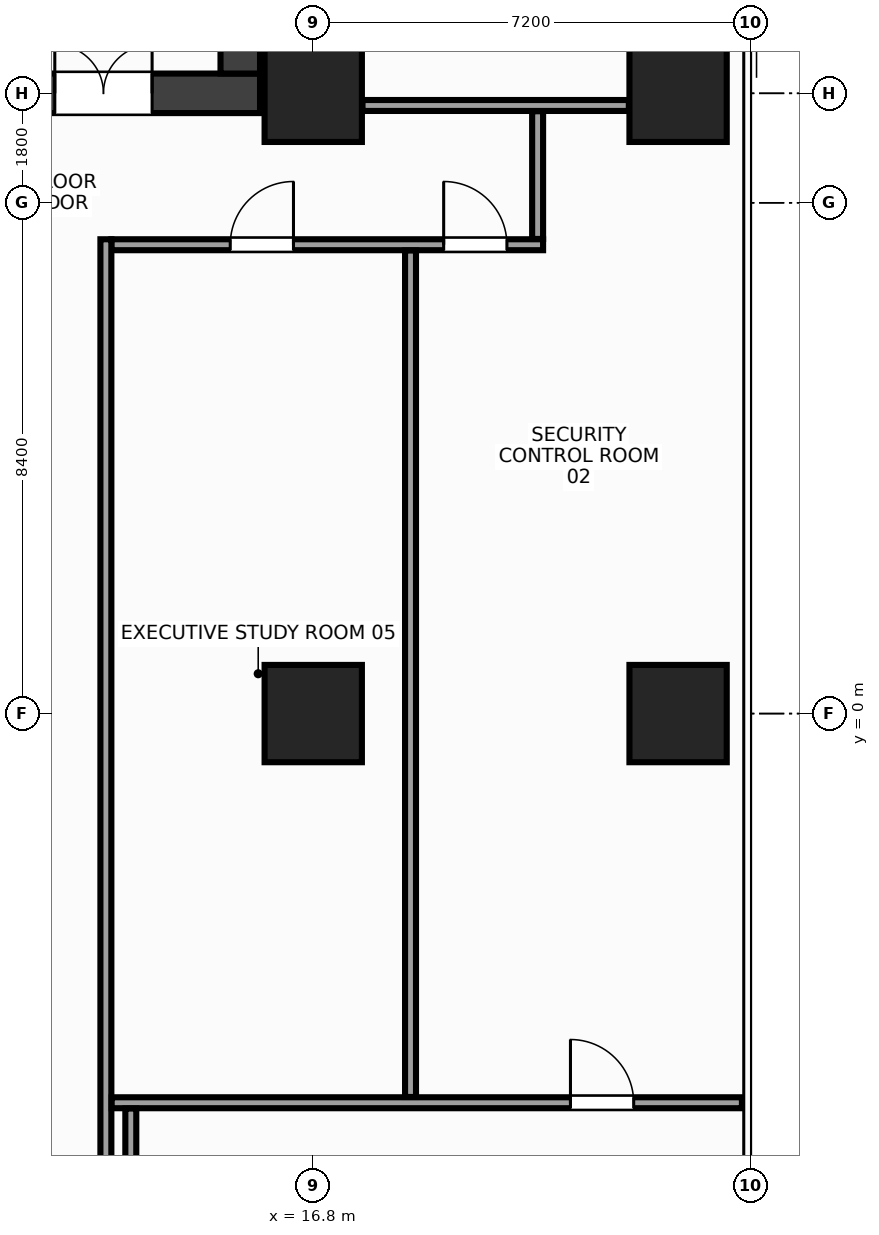
"""IFC4 building model, lengths in metres.
Left out: names, types, materials, properties, quantities, classifications, styles, units other than length and angle.
Written with IfcOpenShell. Run it as: python <this file> out.ifc"""

import sys

from ifc_helpers import new_model, si_unit, direction, frame, frame_2d, origin, origin_2d, place, context, subcontext, project, spatial, rectangle, extrude, source, transform, mapped, element, fill, save


model = new_model("IFC4")
c1 = context("Model", 3, precision=1e-05, world=origin(), true_north=direction((0.0, 1.0)))
c2 = subcontext(c1, "Body", "Model", "MODEL_VIEW")
j1 = project(units=[si_unit("LENGTHUNIT", "METRE"), si_unit("PLANEANGLEUNIT", "RADIAN")], contexts=[c1])
p1 = place(None, origin())
s1 = spatial("IfcSite", under=j1, at=p1, CompositionType="ELEMENT")
p2 = place(p1, origin())
s2 = spatial("IfcBuilding", under=s1, at=p2, CompositionType="ELEMENT")
p3 = place(p2, frame((0.0, 0.0, 167.6)))
s3 = spatial("IfcBuildingStorey", under=s2, at=p3, CompositionType="ELEMENT", Elevation=167.6)
m1 = source(origin(), c2, "Body", "SweptSolid", [
    extrude(rectangle(XDim=31.85, YDim=0.65, at=frame_2d((15.925, 0.0))), origin(), (0.0, 0.0, 1.0), 3.6),
])
p4 = place(p3, frame((-15.925, 10.2, 0.0), z_axis=(0.0, 0.0, 1.0), x_axis=(1.0, 0.0, 0.0)))
e1 = element("IfcWall", 1, at=p4, inside=s3, PredefinedType="SHEAR", context=c2, shape_type="MappedRepresentation", body=[
    mapped(m1, transform((0.0, 0.0, 0.0), x_axis=(1.0, 0.0, 0.0), y_axis=(0.0, 1.0, 0.0), z_axis=(0.0, 0.0, 1.0), scale=1.0)),
])
p5 = place(p4, frame((1.775, 0.0, 0.0)))
e2 = element("IfcOpeningElement", 2, at=p5, cuts=e1, PredefinedType="OPENING", context=c2, shape_type="SweptSolid", body=[
    extrude(rectangle(XDim=1.6, YDim=2.15, at=frame_2d((0.8, 1.075))), frame((0.0, 0.337, 0.0), z_axis=(0.0, -1.0, 0.0), x_axis=(1.0, 0.0, 0.0)), (0.0, 0.0, 1.0), 0.674),
])
p6 = place(p4, frame((28.475, 0.0, 0.0)))
e3 = element("IfcOpeningElement", 3, at=p6, cuts=e1, PredefinedType="OPENING", context=c2, shape_type="SweptSolid", body=[
    extrude(rectangle(XDim=1.6, YDim=2.15, at=frame_2d((0.8, 1.075))), frame((0.0, 0.337, 0.0), z_axis=(0.0, -1.0, 0.0), x_axis=(1.0, 0.0, 0.0)), (0.0, 0.0, 1.0), 0.674),
])
p7 = place(p4, frame((15.175, 0.0, 0.0)))
e4 = element("IfcOpeningElement", 4, at=p7, cuts=e1, PredefinedType="OPENING", context=c2, shape_type="SweptSolid", body=[
    extrude(rectangle(XDim=1.5, YDim=2.2, at=frame_2d((0.75, 1.1))), frame((0.0, 0.337, 0.0), z_axis=(0.0, -1.0, 0.0), x_axis=(1.0, 0.0, 0.0)), (0.0, 0.0, 1.0), 0.674),
])
m2 = source(origin(), c2, "Body", "SweptSolid", [
    extrude(rectangle(XDim=12.95, YDim=0.65, at=frame_2d((6.475, 0.0))), origin(), (0.0, 0.0, 1.0), 3.6),
])
p8 = place(p3, frame((15.6, 10.525, 0.0), z_axis=(0.0, 0.0, 1.0), x_axis=(0.0, 1.0, 0.0)))
e5 = element("IfcWall", 5, at=p8, inside=s3, PredefinedType="SHEAR", context=c2, shape_type="MappedRepresentation", body=[
    mapped(m2, transform((0.0, 0.0, 0.0), x_axis=(1.0, 0.0, 0.0), y_axis=(0.0, 1.0, 0.0), z_axis=(0.0, 0.0, 1.0), scale=1.0)),
])
m3 = source(origin(), c2, "Body", "SweptSolid", [
    extrude(rectangle(XDim=1.6, YDim=1.6, at=origin_2d()), origin(), (0.0, 0.0, 1.0), 3.6),
])
for number, where, z_axis, x_axis in (
    (6, (16.8, 0.0, 0.0), (0.0, 0.0, 1.0), (1.0, 0.0, 0.0)),
    (7, (16.8, 10.2, 0.0), (0.0, 0.0, 1.0), (1.0, 0.0, 0.0)),
    (8, (22.8, 0.0, 0.0), (0.0, 0.0, 1.0), (1.0, 0.0, 0.0)),
    (9, (22.8, 10.2, 0.0), (0.0, 0.0, 1.0), (1.0, 0.0, 0.0)),
):
    element("IfcColumn", number, at=place(p3, frame(where, z_axis=z_axis, x_axis=x_axis)), inside=s3, PredefinedType="COLUMN", context=c2, shape_type="MappedRepresentation", body=[
        mapped(m3, transform((0.0, 0.0, 0.0), x_axis=(1.0, 0.0, 0.0), y_axis=(0.0, 1.0, 0.0), z_axis=(0.0, 0.0, 1.0), scale=1.0)),
    ])
m4 = source(origin(), c2, "Body", "SweptSolid", [
    extrude(rectangle(XDim=4.38, YDim=0.18, at=frame_2d((2.19, 0.0))), origin(), (0.0, 0.0, 1.0), 2.915),
])
p9 = place(p3, frame((17.61, 10.0, 0.0), z_axis=(0.0, 0.0, 1.0), x_axis=(1.0, 0.0, 0.0)))
e10 = element("IfcWall", 10, at=p9, inside=s3, PredefinedType="PARTITIONING", context=c2, shape_type="MappedRepresentation", body=[
    mapped(m4, transform((0.0, 0.0, 0.0), x_axis=(1.0, 0.0, 0.0), y_axis=(0.0, 1.0, 0.0), z_axis=(0.0, 0.0, 1.0), scale=1.0)),
])
m5 = source(origin(), c2, "Body", "SweptSolid", [
    extrude(rectangle(XDim=7.1, YDim=0.18, at=frame_2d((3.55, 0.0))), origin(), (0.0, 0.0, 1.0), 2.765),
])
p10 = place(p3, frame((13.48, 7.71, 0.0), z_axis=(0.0, 0.0, 1.0), x_axis=(1.0, 0.0, 0.0)))
e11 = element("IfcWall", 11, at=p10, inside=s3, PredefinedType="PARTITIONING", context=c2, shape_type="MappedRepresentation", body=[
    mapped(m5, transform((0.0, 0.0, 0.0), x_axis=(1.0, 0.0, 0.0), y_axis=(0.0, 1.0, 0.0), z_axis=(0.0, 0.0, 1.0), scale=1.0)),
])
p11 = place(p10, frame((5.465, 0.0, 0.0)))
e12 = element("IfcOpeningElement", 12, at=p11, cuts=e11, PredefinedType="OPENING", context=c2, shape_type="SweptSolid", body=[
    extrude(rectangle(XDim=1.04, YDim=2.2, at=frame_2d((0.52, 1.1))), frame((0.0, 0.102, 0.0), z_axis=(0.0, -1.0, 0.0), x_axis=(1.0, 0.0, 0.0)), (0.0, 0.0, 1.0), 0.204),
])
p12 = place(p10, frame((1.955, 0.0, 0.0)))
e13 = element("IfcOpeningElement", 13, at=p12, cuts=e11, PredefinedType="OPENING", context=c2, shape_type="SweptSolid", body=[
    extrude(rectangle(XDim=1.04, YDim=2.2, at=frame_2d((0.52, 1.1))), frame((0.0, 0.102, 0.0), z_axis=(0.0, -1.0, 0.0), x_axis=(1.0, 0.0, 0.0)), (0.0, 0.0, 1.0), 0.204),
])
m6 = source(origin(), c2, "Body", "SweptSolid", [
    extrude(rectangle(XDim=2.1, YDim=0.18, at=frame_2d((1.05, 0.0))), origin(), (0.0, 0.0, 1.0), 3.38),
])
p13 = place(p3, frame((20.49, 7.805, 0.0), z_axis=(0.0, 0.0, 1.0), x_axis=(0.0, 1.0, 0.0)))
e14 = element("IfcWall", 14, at=p13, inside=s3, PredefinedType="PARTITIONING", context=c2, shape_type="MappedRepresentation", body=[
    mapped(m6, transform((0.0, 0.0, 0.0), x_axis=(1.0, 0.0, 0.0), y_axis=(0.0, 1.0, 0.0), z_axis=(0.0, 0.0, 1.0), scale=1.0)),
])
m7 = source(origin(), c2, "Body", "SweptSolid", [
    extrude(rectangle(XDim=22.595, YDim=0.18, at=frame_2d((11.297, 0.0))), origin(), (0.0, 0.0, 1.0), 2.665),
])
p14 = place(p3, frame((13.39, -14.795, 0.0), z_axis=(0.0, 0.0, 1.0), x_axis=(0.0, 1.0, 0.0)))
e15 = element("IfcWall", 15, at=p14, inside=s3, PredefinedType="PARTITIONING", context=c2, shape_type="MappedRepresentation", body=[
    mapped(m7, transform((0.0, 0.0, 0.0), x_axis=(1.0, 0.0, 0.0), y_axis=(0.0, 1.0, 0.0), z_axis=(0.0, 0.0, 1.0), scale=1.0)),
])
m8 = source(origin(), c2, "Body", "SweptSolid", [
    extrude(rectangle(XDim=10.365, YDim=0.18, at=frame_2d((5.183, 0.0))), origin(), (0.0, 0.0, 1.0), 2.765),
])
p15 = place(p3, frame((13.485, -6.4, 0.0), z_axis=(0.0, 0.0, 1.0), x_axis=(1.0, 0.0, 0.0)))
e16 = element("IfcWall", 16, at=p15, inside=s3, PredefinedType="PARTITIONING", context=c2, shape_type="MappedRepresentation", body=[
    mapped(m8, transform((0.0, 0.0, 0.0), x_axis=(1.0, 0.0, 0.0), y_axis=(0.0, 1.0, 0.0), z_axis=(0.0, 0.0, 1.0), scale=1.0)),
])
p16 = place(p15, frame((7.545, 0.0, 0.0)))
e17 = element("IfcOpeningElement", 17, at=p16, cuts=e16, PredefinedType="OPENING", context=c2, shape_type="SweptSolid", body=[
    extrude(rectangle(XDim=1.04, YDim=2.2, at=frame_2d((0.52, 1.1))), frame((0.0, 0.102, 0.0), z_axis=(0.0, -1.0, 0.0), x_axis=(1.0, 0.0, 0.0)), (0.0, 0.0, 1.0), 0.204),
])
m9 = source(origin(), c2, "Body", "SweptSolid", [
    extrude(rectangle(XDim=13.92, YDim=0.18, at=frame_2d((6.96, 0.0))), origin(), (0.0, 0.0, 1.0), 2.915),
])
p17 = place(p3, frame((18.4, -6.305, 0.0), z_axis=(0.0, 0.0, 1.0), x_axis=(0.0, 1.0, 0.0)))
e18 = element("IfcWall", 18, at=p17, inside=s3, PredefinedType="PARTITIONING", context=c2, shape_type="MappedRepresentation", body=[
    mapped(m9, transform((0.0, 0.0, 0.0), x_axis=(1.0, 0.0, 0.0), y_axis=(0.0, 1.0, 0.0), z_axis=(0.0, 0.0, 1.0), scale=1.0)),
])
m10 = source(origin(), c2, "Body", "SweptSolid", [
    extrude(rectangle(XDim=16.155, YDim=0.18, at=frame_2d((8.077, 0.0))), origin(), (0.0, 0.0, 1.0), 2.915),
])
p18 = place(p3, frame((13.8, -22.65, 0.0), z_axis=(0.0, 0.0, 1.0), x_axis=(0.0, 1.0, 0.0)))
e19 = element("IfcWall", 19, at=p18, inside=s3, PredefinedType="PARTITIONING", context=c2, shape_type="MappedRepresentation", body=[
    mapped(m10, transform((0.0, 0.0, 0.0), x_axis=(1.0, 0.0, 0.0), y_axis=(0.0, 1.0, 0.0), z_axis=(0.0, 0.0, 1.0), scale=1.0)),
])
m11 = source(origin(), c2, "Body", "SweptSolid", [
    extrude(rectangle(XDim=1.6, YDim=2.15, at=frame_2d((0.8, 1.075))), frame((0.0, 0.025, 0.0), z_axis=(0.0, -1.0, 0.0), x_axis=(1.0, 0.0, 0.0)), (0.0, 0.0, 1.0), 0.05),
])
p19 = place(p6, origin())
e20 = element("IfcDoor", 20, at=p19, inside=s3, OperationType="DOUBLE_DOOR_SINGLE_SWING", PredefinedType="DOOR", context=c2, shape_type="MappedRepresentation", body=[
    mapped(m11, transform((0.0, 0.0, 0.0), x_axis=(1.0, 0.0, 0.0), y_axis=(0.0, 1.0, 0.0), z_axis=(0.0, 0.0, 1.0), scale=1.0)),
])
fill(e3, e20)
m12 = source(origin(), c2, "Body", "SweptSolid", [
    extrude(rectangle(XDim=1.04, YDim=2.2, at=frame_2d((0.52, 1.1))), frame((0.0, 0.025, 0.0), z_axis=(0.0, -1.0, 0.0), x_axis=(1.0, 0.0, 0.0)), (0.0, 0.0, 1.0), 0.05),
])
p20 = place(p11, origin())
e21 = element("IfcDoor", 21, at=p20, inside=s3, OperationType="SINGLE_SWING_LEFT", PredefinedType="DOOR", context=c2, shape_type="MappedRepresentation", body=[
    mapped(m12, transform((0.0, 0.0, 0.0), x_axis=(1.0, 0.0, 0.0), y_axis=(0.0, 1.0, 0.0), z_axis=(0.0, 0.0, 1.0), scale=1.0)),
])
fill(e12, e21)
p21 = place(p12, origin())
e22 = element("IfcDoor", 22, at=p21, inside=s3, OperationType="SINGLE_SWING_RIGHT", PredefinedType="DOOR", context=c2, shape_type="MappedRepresentation", body=[
    mapped(m12, transform((0.0, 0.0, 0.0), x_axis=(1.0, 0.0, 0.0), y_axis=(0.0, 1.0, 0.0), z_axis=(0.0, 0.0, 1.0), scale=1.0)),
])
fill(e13, e22)
p22 = place(p16, origin())
e23 = element("IfcDoor", 23, at=p22, inside=s3, OperationType="SINGLE_SWING_LEFT", PredefinedType="DOOR", context=c2, shape_type="MappedRepresentation", body=[
    mapped(m12, transform((0.0, 0.0, 0.0), x_axis=(1.0, 0.0, 0.0), y_axis=(0.0, 1.0, 0.0), z_axis=(0.0, 0.0, 1.0), scale=1.0)),
])
fill(e17, e23)
save(model, sys.argv[1])
